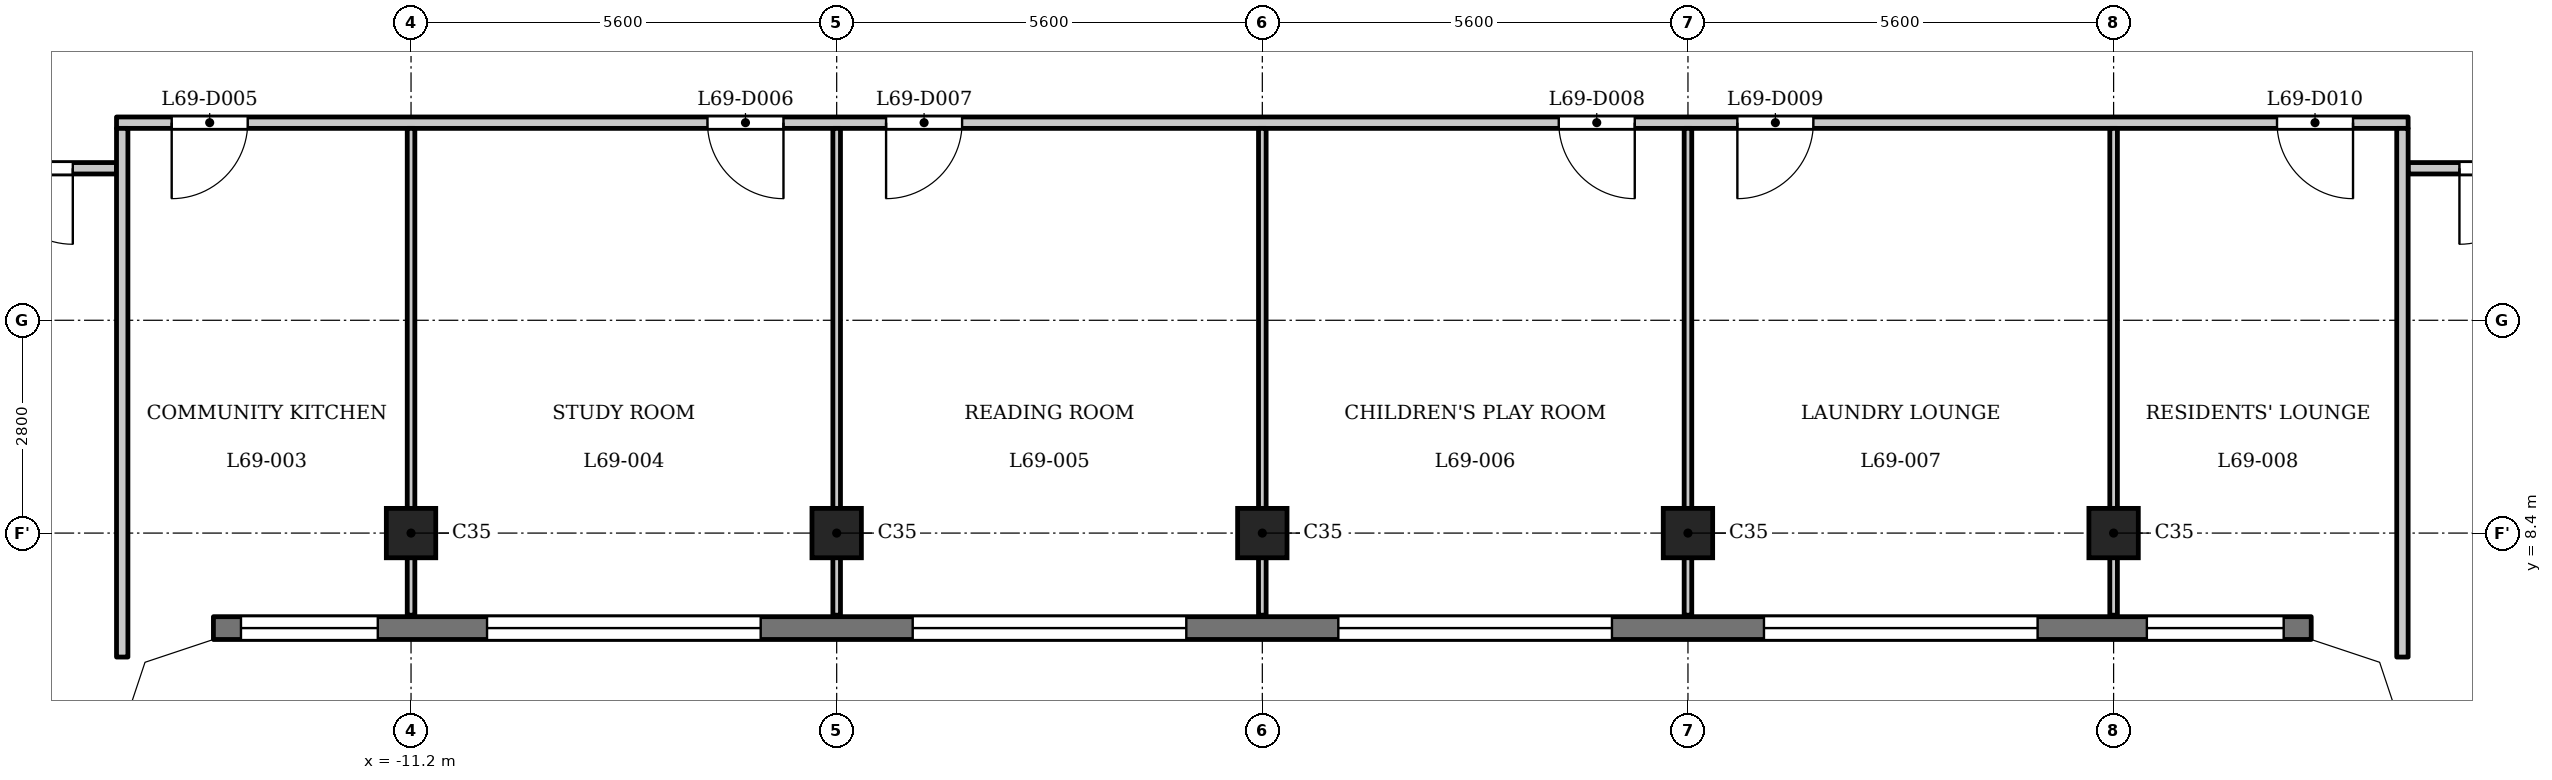
"""IFC4 building model, lengths in metres.
Left out: names, types, materials, properties, quantities, classifications, styles, units other than length and angle.
Written with IfcOpenShell. Run it as: python <this file> out.ifc"""

import sys

from ifc_helpers import new_model, si_unit, direction, frame, frame_2d, origin, origin_2d, place, context, subcontext, project, spatial, polyline, rectangle, outline, extrude, element, fill, save


model = new_model("IFC4")
c1 = context("Model", 3, precision=1e-05, world=origin(), true_north=direction((0.0, 1.0)))
c2 = subcontext(c1, "Body", "Model", "MODEL_VIEW")
j1 = project(units=[si_unit("LENGTHUNIT", "METRE"), si_unit("PLANEANGLEUNIT", "RADIAN")], contexts=[c1])
p1 = place(None, origin())
s1 = spatial("IfcSite", under=j1, at=p1, CompositionType="ELEMENT")
p2 = place(p1, origin())
s2 = spatial("IfcBuilding", under=s1, at=p2, CompositionType="ELEMENT")
p3 = place(p2, frame((0.0, 0.0, 266.2)))
s3 = spatial("IfcBuildingStorey", under=s2, at=p3, CompositionType="ELEMENT", Elevation=266.2)
for number, where, z_axis, x_axis in (
    (1, (-11.2, 8.4, 0.0), (0.0, 0.0, 1.0), (1.0, 0.0, 0.0)),
    (2, (-5.6, 8.4, 0.0), (0.0, 0.0, 1.0), (1.0, 0.0, 0.0)),
    (3, (0.0, 8.4, 0.0), (0.0, 0.0, 1.0), (1.0, 0.0, 0.0)),
    (4, (5.6, 8.4, 0.0), (0.0, 0.0, 1.0), (1.0, 0.0, 0.0)),
    (5, (11.2, 8.4, 0.0), (0.0, 0.0, 1.0), (1.0, 0.0, 0.0)),
):
    element("IfcColumn", number, at=place(p3, frame(where, z_axis=z_axis, x_axis=x_axis)), inside=s3, PredefinedType="COLUMN", context=c2, shape_type="SweptSolid", body=[
        extrude(rectangle(XDim=0.65, YDim=0.65, at=origin_2d()), origin(), (0.0, 0.0, 1.0), 3.5),
    ])
p4 = place(p3, frame((-13.8, 7.15, 0.0), z_axis=(0.0, 0.0, 1.0), x_axis=(1.0, 0.0, 0.0)))
e6 = element("IfcWall", 6, at=p4, inside=s3, PredefinedType="SOLIDWALL", context=c2, shape_type="SweptSolid", body=[
    extrude(rectangle(XDim=27.6, YDim=0.3, at=frame_2d((13.8, 0.0))), origin(), (0.0, 0.0, 1.0), 3.2),
])
p5 = place(p4, frame((0.363, 0.0, 0.9)))
e7 = element("IfcOpeningElement", 7, at=p5, cuts=e6, PredefinedType="OPENING", context=c2, shape_type="SweptSolid", body=[
    extrude(rectangle(XDim=1.8, YDim=1.25, at=frame_2d((0.9, 0.625))), frame((0.0, 0.16, 0.0), z_axis=(0.0, -1.0, 0.0), x_axis=(1.0, 0.0, 0.0)), (0.0, 0.0, 1.0), 0.32),
])
p6 = place(p4, frame((3.6, 0.0, 1.2)))
e8 = element("IfcOpeningElement", 8, at=p6, cuts=e6, PredefinedType="OPENING", context=c2, shape_type="SweptSolid", body=[
    extrude(rectangle(XDim=3.6, YDim=0.95, at=frame_2d((1.8, 0.475))), frame((0.0, 0.16, 0.0), z_axis=(0.0, -1.0, 0.0), x_axis=(1.0, 0.0, 0.0)), (0.0, 0.0, 1.0), 0.32),
])
p7 = place(p4, frame((9.2, 0.0, 1.2)))
e9 = element("IfcOpeningElement", 9, at=p7, cuts=e6, PredefinedType="OPENING", context=c2, shape_type="SweptSolid", body=[
    extrude(rectangle(XDim=3.6, YDim=0.95, at=frame_2d((1.8, 0.475))), frame((0.0, 0.16, 0.0), z_axis=(0.0, -1.0, 0.0), x_axis=(1.0, 0.0, 0.0)), (0.0, 0.0, 1.0), 0.32),
])
p8 = place(p4, frame((14.8, 0.0, 1.2)))
e10 = element("IfcOpeningElement", 10, at=p8, cuts=e6, PredefinedType="OPENING", context=c2, shape_type="SweptSolid", body=[
    extrude(rectangle(XDim=3.6, YDim=0.95, at=frame_2d((1.8, 0.475))), frame((0.0, 0.16, 0.0), z_axis=(0.0, -1.0, 0.0), x_axis=(1.0, 0.0, 0.0)), (0.0, 0.0, 1.0), 0.32),
])
p9 = place(p4, frame((20.4, 0.0, 1.2)))
e11 = element("IfcOpeningElement", 11, at=p9, cuts=e6, PredefinedType="OPENING", context=c2, shape_type="SweptSolid", body=[
    extrude(rectangle(XDim=3.6, YDim=0.95, at=frame_2d((1.8, 0.475))), frame((0.0, 0.16, 0.0), z_axis=(0.0, -1.0, 0.0), x_axis=(1.0, 0.0, 0.0)), (0.0, 0.0, 1.0), 0.32),
])
p10 = place(p4, frame((25.438, 0.0, 0.9)))
e12 = element("IfcOpeningElement", 12, at=p10, cuts=e6, PredefinedType="OPENING", context=c2, shape_type="SweptSolid", body=[
    extrude(rectangle(XDim=1.8, YDim=1.25, at=frame_2d((0.9, 0.625))), frame((0.0, 0.16, 0.0), z_axis=(0.0, -1.0, 0.0), x_axis=(1.0, 0.0, 0.0)), (0.0, 0.0, 1.0), 0.32),
])
p11 = place(p3, frame((-17.4, 13.2, 0.0), z_axis=(0.0, 0.0, 1.0), x_axis=(1.0, 0.0, 0.0)))
e13 = element("IfcWall", 13, at=p11, inside=s3, PredefinedType="PARTITIONING", context=c2, shape_type="SweptSolid", body=[
    extrude(rectangle(XDim=2.325, YDim=0.15, at=frame_2d((1.163, 0.0))), origin(), (0.0, 0.0, 1.0), 3.2),
])
p12 = place(p11, frame((0.75, 0.0, 0.0)))
e14 = element("IfcOpeningElement", 14, at=p12, cuts=e13, PredefinedType="OPENING", context=c2, shape_type="SweptSolid", body=[
    extrude(rectangle(XDim=1.0, YDim=2.1, at=frame_2d((0.5, 1.05))), frame((0.0, 0.085, 0.0), z_axis=(0.0, -1.0, 0.0), x_axis=(1.0, 0.0, 0.0)), (0.0, 0.0, 1.0), 0.17),
])
p13 = place(p3, frame((15.075, 13.2, 0.0), z_axis=(0.0, 0.0, 1.0), x_axis=(1.0, 0.0, 0.0)))
e15 = element("IfcWall", 15, at=p13, inside=s3, PredefinedType="PARTITIONING", context=c2, shape_type="SweptSolid", body=[
    extrude(rectangle(XDim=2.325, YDim=0.15, at=frame_2d((1.163, 0.0))), origin(), (0.0, 0.0, 1.0), 3.2),
])
p14 = place(p13, frame((0.675, 0.0, 0.0)))
e16 = element("IfcOpeningElement", 16, at=p14, cuts=e15, PredefinedType="OPENING", context=c2, shape_type="SweptSolid", body=[
    extrude(rectangle(XDim=1.0, YDim=2.1, at=frame_2d((0.5, 1.05))), frame((0.0, 0.085, 0.0), z_axis=(0.0, -1.0, 0.0), x_axis=(1.0, 0.0, 0.0)), (0.0, 0.0, 1.0), 0.17),
])
p15 = place(p3, frame((-15.075, 13.8, 0.0), z_axis=(0.0, 0.0, 1.0), x_axis=(1.0, 0.0, 0.0)))
e17 = element("IfcWall", 17, at=p15, inside=s3, PredefinedType="PARTITIONING", context=c2, shape_type="SweptSolid", body=[
    extrude(rectangle(XDim=30.15, YDim=0.15, at=frame_2d((15.075, 0.0))), origin(), (0.0, 0.0, 1.0), 3.2),
])
p16 = place(p15, frame((0.726, 0.0, 0.0)))
e18 = element("IfcOpeningElement", 18, at=p16, cuts=e17, PredefinedType="OPENING", context=c2, shape_type="SweptSolid", body=[
    extrude(rectangle(XDim=1.0, YDim=2.1, at=frame_2d((0.5, 1.05))), frame((0.0, 0.085, 0.0), z_axis=(0.0, -1.0, 0.0), x_axis=(1.0, 0.0, 0.0)), (0.0, 0.0, 1.0), 0.17),
])
p17 = place(p15, frame((7.775, 0.0, 0.0)))
e19 = element("IfcOpeningElement", 19, at=p17, cuts=e17, PredefinedType="OPENING", context=c2, shape_type="SweptSolid", body=[
    extrude(rectangle(XDim=1.0, YDim=2.1, at=frame_2d((0.5, 1.05))), frame((0.0, 0.085, 0.0), z_axis=(0.0, -1.0, 0.0), x_axis=(1.0, 0.0, 0.0)), (0.0, 0.0, 1.0), 0.17),
])
p18 = place(p15, frame((10.125, 0.0, 0.0)))
e20 = element("IfcOpeningElement", 20, at=p18, cuts=e17, PredefinedType="OPENING", context=c2, shape_type="SweptSolid", body=[
    extrude(rectangle(XDim=1.0, YDim=2.1, at=frame_2d((0.5, 1.05))), frame((0.0, 0.085, 0.0), z_axis=(0.0, -1.0, 0.0), x_axis=(1.0, 0.0, 0.0)), (0.0, 0.0, 1.0), 0.17),
])
p19 = place(p15, frame((18.975, 0.0, 0.0)))
e21 = element("IfcOpeningElement", 21, at=p19, cuts=e17, PredefinedType="OPENING", context=c2, shape_type="SweptSolid", body=[
    extrude(rectangle(XDim=1.0, YDim=2.1, at=frame_2d((0.5, 1.05))), frame((0.0, 0.085, 0.0), z_axis=(0.0, -1.0, 0.0), x_axis=(1.0, 0.0, 0.0)), (0.0, 0.0, 1.0), 0.17),
])
p20 = place(p15, frame((21.325, 0.0, 0.0)))
e22 = element("IfcOpeningElement", 22, at=p20, cuts=e17, PredefinedType="OPENING", context=c2, shape_type="SweptSolid", body=[
    extrude(rectangle(XDim=1.0, YDim=2.1, at=frame_2d((0.5, 1.05))), frame((0.0, 0.085, 0.0), z_axis=(0.0, -1.0, 0.0), x_axis=(1.0, 0.0, 0.0)), (0.0, 0.0, 1.0), 0.17),
])
p21 = place(p15, frame((28.425, 0.0, 0.0)))
e23 = element("IfcOpeningElement", 23, at=p21, cuts=e17, PredefinedType="OPENING", context=c2, shape_type="SweptSolid", body=[
    extrude(rectangle(XDim=1.0, YDim=2.1, at=frame_2d((0.5, 1.05))), frame((0.0, 0.085, 0.0), z_axis=(0.0, -1.0, 0.0), x_axis=(1.0, 0.0, 0.0)), (0.0, 0.0, 1.0), 0.17),
])
p22 = place(p3, frame((-15.0, 6.769, 0.0), z_axis=(0.0, 0.0, 1.0), x_axis=(0.0, 1.0, 0.0)))
e24 = element("IfcWall", 24, at=p22, inside=s3, PredefinedType="PARTITIONING", context=c2, shape_type="SweptSolid", body=[
    extrude(rectangle(XDim=6.956, YDim=0.15, at=frame_2d((3.478, 0.0))), origin(), (0.0, 0.0, 1.0), 3.2),
])
for number, where, z_axis, x_axis in (
    (25, (-11.2, 7.32, 0.0), (0.0, 0.0, 1.0), (0.0, 1.0, 0.0)),
    (26, (-5.6, 7.32, 0.0), (0.0, 0.0, 1.0), (0.0, 1.0, 0.0)),
    (27, (0.0, 7.32, 0.0), (0.0, 0.0, 1.0), (0.0, 1.0, 0.0)),
    (28, (5.6, 7.32, 0.0), (0.0, 0.0, 1.0), (0.0, 1.0, 0.0)),
    (29, (11.2, 7.32, 0.0), (0.0, 0.0, 1.0), (0.0, 1.0, 0.0)),
):
    element("IfcWall", number, at=place(p3, frame(where, z_axis=z_axis, x_axis=x_axis)), inside=s3, PredefinedType="PARTITIONING", context=c2, shape_type="SweptSolid", body=[
        extrude(rectangle(XDim=6.405, YDim=0.1, at=frame_2d((3.203, 0.0))), origin(), (0.0, 0.0, 1.0), 3.2),
    ])
p23 = place(p3, frame((15.0, 6.769, 0.0), z_axis=(0.0, 0.0, 1.0), x_axis=(0.0, 1.0, 0.0)))
e30 = element("IfcWall", 30, at=p23, inside=s3, PredefinedType="PARTITIONING", context=c2, shape_type="SweptSolid", body=[
    extrude(rectangle(XDim=6.956, YDim=0.15, at=frame_2d((3.478, 0.0))), origin(), (0.0, 0.0, 1.0), 3.2),
])
p24 = place(p3, origin())
e31 = element("IfcWall", 31, at=p24, inside=s3, PredefinedType="SOLIDWALL", context=c2, shape_type="SweptSolid", body=[
    extrude(outline(polyline([(-13.849, 7.3), (-14.937, 6.937), (-15.3, 5.849), (-15.3, 5.8), (-15.0, 5.8), (-14.7, 6.7), (-13.8, 7.0), (-13.8, 7.3), (-13.849, 7.3)])), origin(), (0.0, 0.0, 1.0), 3.2),
])
e32 = element("IfcWall", 32, at=p24, inside=s3, PredefinedType="SOLIDWALL", context=c2, shape_type="SweptSolid", body=[
    extrude(outline(polyline([(14.937, 6.937), (13.849, 7.3), (13.8, 7.3), (13.8, 7.0), (14.7, 6.7), (15.0, 5.8), (15.3, 5.8), (15.3, 5.849), (14.937, 6.937)])), origin(), (0.0, 0.0, 1.0), 3.2),
])
p25 = place(p12, origin())
e33 = element("IfcDoor", 33, at=p25, inside=s3, OperationType="SINGLE_SWING_RIGHT", PredefinedType="DOOR", context=c2, shape_type="SweptSolid", body=[
    extrude(rectangle(XDim=1.0, YDim=2.1, at=frame_2d((0.5, 1.05))), frame((0.0, 0.025, 0.0), z_axis=(0.0, -1.0, 0.0), x_axis=(1.0, 0.0, 0.0)), (0.0, 0.0, 1.0), 0.05),
])
fill(e14, e33)
p26 = place(p14, origin())
e34 = element("IfcDoor", 34, at=p26, inside=s3, OperationType="SINGLE_SWING_LEFT", PredefinedType="DOOR", context=c2, shape_type="SweptSolid", body=[
    extrude(rectangle(XDim=1.0, YDim=2.1, at=frame_2d((0.5, 1.05))), frame((0.0, 0.025, 0.0), z_axis=(0.0, -1.0, 0.0), x_axis=(1.0, 0.0, 0.0)), (0.0, 0.0, 1.0), 0.05),
])
fill(e16, e34)
p27 = place(p16, origin())
e35 = element("IfcDoor", 35, at=p27, inside=s3, OperationType="SINGLE_SWING_LEFT", PredefinedType="DOOR", context=c2, shape_type="SweptSolid", body=[
    extrude(rectangle(XDim=1.0, YDim=2.1, at=frame_2d((0.5, 1.05))), frame((0.0, 0.025, 0.0), z_axis=(0.0, -1.0, 0.0), x_axis=(1.0, 0.0, 0.0)), (0.0, 0.0, 1.0), 0.05),
])
fill(e18, e35)
p28 = place(p17, origin())
e36 = element("IfcDoor", 36, at=p28, inside=s3, OperationType="SINGLE_SWING_RIGHT", PredefinedType="DOOR", context=c2, shape_type="SweptSolid", body=[
    extrude(rectangle(XDim=1.0, YDim=2.1, at=frame_2d((0.5, 1.05))), frame((0.0, 0.025, 0.0), z_axis=(0.0, -1.0, 0.0), x_axis=(1.0, 0.0, 0.0)), (0.0, 0.0, 1.0), 0.05),
])
fill(e19, e36)
p29 = place(p18, origin())
e37 = element("IfcDoor", 37, at=p29, inside=s3, OperationType="SINGLE_SWING_LEFT", PredefinedType="DOOR", context=c2, shape_type="SweptSolid", body=[
    extrude(rectangle(XDim=1.0, YDim=2.1, at=frame_2d((0.5, 1.05))), frame((0.0, 0.025, 0.0), z_axis=(0.0, -1.0, 0.0), x_axis=(1.0, 0.0, 0.0)), (0.0, 0.0, 1.0), 0.05),
])
fill(e20, e37)
p30 = place(p19, origin())
e38 = element("IfcDoor", 38, at=p30, inside=s3, OperationType="SINGLE_SWING_RIGHT", PredefinedType="DOOR", context=c2, shape_type="SweptSolid", body=[
    extrude(rectangle(XDim=1.0, YDim=2.1, at=frame_2d((0.5, 1.05))), frame((0.0, 0.025, 0.0), z_axis=(0.0, -1.0, 0.0), x_axis=(1.0, 0.0, 0.0)), (0.0, 0.0, 1.0), 0.05),
])
fill(e21, e38)
p31 = place(p20, origin())
e39 = element("IfcDoor", 39, at=p31, inside=s3, OperationType="SINGLE_SWING_LEFT", PredefinedType="DOOR", context=c2, shape_type="SweptSolid", body=[
    extrude(rectangle(XDim=1.0, YDim=2.1, at=frame_2d((0.5, 1.05))), frame((0.0, 0.025, 0.0), z_axis=(0.0, -1.0, 0.0), x_axis=(1.0, 0.0, 0.0)), (0.0, 0.0, 1.0), 0.05),
])
fill(e22, e39)
p32 = place(p21, origin())
e40 = element("IfcDoor", 40, at=p32, inside=s3, OperationType="SINGLE_SWING_RIGHT", PredefinedType="DOOR", context=c2, shape_type="SweptSolid", body=[
    extrude(rectangle(XDim=1.0, YDim=2.1, at=frame_2d((0.5, 1.05))), frame((0.0, 0.025, 0.0), z_axis=(0.0, -1.0, 0.0), x_axis=(1.0, 0.0, 0.0)), (0.0, 0.0, 1.0), 0.05),
])
fill(e23, e40)
p33 = place(p5, origin())
e41 = element("IfcWindow", 41, at=p33, inside=s3, PartitioningType="SINGLE_PANEL", PredefinedType="WINDOW", context=c2, shape_type="SweptSolid", body=[
    extrude(rectangle(XDim=1.8, YDim=1.25, at=frame_2d((0.9, 0.625))), frame((0.0, 0.03, 0.0), z_axis=(0.0, -1.0, 0.0), x_axis=(1.0, 0.0, 0.0)), (0.0, 0.0, 1.0), 0.06),
])
fill(e7, e41)
p34 = place(p6, origin())
e42 = element("IfcWindow", 42, at=p34, inside=s3, PartitioningType="SINGLE_PANEL", PredefinedType="WINDOW", context=c2, shape_type="SweptSolid", body=[
    extrude(rectangle(XDim=3.6, YDim=0.95, at=frame_2d((1.8, 0.475))), frame((0.0, 0.03, 0.0), z_axis=(0.0, -1.0, 0.0), x_axis=(1.0, 0.0, 0.0)), (0.0, 0.0, 1.0), 0.06),
])
fill(e8, e42)
p35 = place(p7, origin())
e43 = element("IfcWindow", 43, at=p35, inside=s3, PartitioningType="SINGLE_PANEL", PredefinedType="WINDOW", context=c2, shape_type="SweptSolid", body=[
    extrude(rectangle(XDim=3.6, YDim=0.95, at=frame_2d((1.8, 0.475))), frame((0.0, 0.03, 0.0), z_axis=(0.0, -1.0, 0.0), x_axis=(1.0, 0.0, 0.0)), (0.0, 0.0, 1.0), 0.06),
])
fill(e9, e43)
p36 = place(p8, origin())
e44 = element("IfcWindow", 44, at=p36, inside=s3, PartitioningType="SINGLE_PANEL", PredefinedType="WINDOW", context=c2, shape_type="SweptSolid", body=[
    extrude(rectangle(XDim=3.6, YDim=0.95, at=frame_2d((1.8, 0.475))), frame((0.0, 0.03, 0.0), z_axis=(0.0, -1.0, 0.0), x_axis=(1.0, 0.0, 0.0)), (0.0, 0.0, 1.0), 0.06),
])
fill(e10, e44)
p37 = place(p9, origin())
e45 = element("IfcWindow", 45, at=p37, inside=s3, PartitioningType="SINGLE_PANEL", PredefinedType="WINDOW", context=c2, shape_type="SweptSolid", body=[
    extrude(rectangle(XDim=3.6, YDim=0.95, at=frame_2d((1.8, 0.475))), frame((0.0, 0.03, 0.0), z_axis=(0.0, -1.0, 0.0), x_axis=(1.0, 0.0, 0.0)), (0.0, 0.0, 1.0), 0.06),
])
fill(e11, e45)
p38 = place(p10, origin())
e46 = element("IfcWindow", 46, at=p38, inside=s3, PartitioningType="SINGLE_PANEL", PredefinedType="WINDOW", context=c2, shape_type="SweptSolid", body=[
    extrude(rectangle(XDim=1.8, YDim=1.25, at=frame_2d((0.9, 0.625))), frame((0.0, 0.03, 0.0), z_axis=(0.0, -1.0, 0.0), x_axis=(1.0, 0.0, 0.0)), (0.0, 0.0, 1.0), 0.06),
])
fill(e12, e46)
save(model, sys.argv[1])
